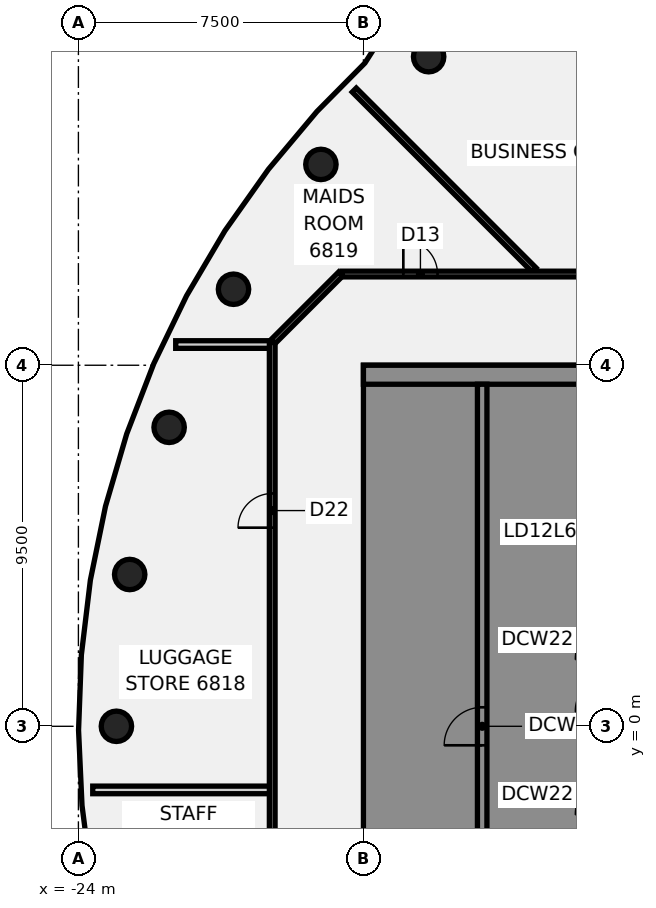
"""IFC4 building model, lengths in metres.
Left out: names, types, materials, properties, quantities, classifications, styles, units other than length and angle.
Written with IfcOpenShell. Run it as: python <this file> out.ifc"""

import sys

from ifc_helpers import new_model, si_unit, direction, frame, frame_2d, origin, origin_2d, place, context, subcontext, project, spatial, polyline, rectangle, circle, outline, extrude, element, fill, save


model = new_model("IFC4")
c1 = context("Model", 3, precision=1e-05, world=origin(), true_north=direction((0.0, 1.0)))
c2 = subcontext(c1, "Body", "Model", "MODEL_VIEW")
j1 = project(units=[si_unit("LENGTHUNIT", "METRE"), si_unit("PLANEANGLEUNIT", "RADIAN")], contexts=[c1])
p1 = place(None, origin())
s1 = spatial("IfcSite", under=j1, at=p1, CompositionType="ELEMENT")
p2 = place(p1, origin())
s2 = spatial("IfcBuilding", under=s1, at=p2, CompositionType="ELEMENT")
p3 = place(p2, frame((0.0, 0.0, 267.6)))
s3 = spatial("IfcBuildingStorey", under=s2, at=p3, CompositionType="ELEMENT", Elevation=267.6)
for number, where, z_axis, x_axis in (
    (1, (-14.784, 17.619, -0.14), (0.0, 0.0, 1.0), (1.0, 0.0, 0.0)),
    (2, (-17.619, 14.784, -0.14), (0.0, 0.0, 1.0), (1.0, 0.0, 0.0)),
    (3, (-19.919, 11.5, -0.14), (0.0, 0.0, 1.0), (1.0, 0.0, 0.0)),
    (4, (-21.613, 7.866, -0.14), (0.0, 0.0, 1.0), (1.0, 0.0, 0.0)),
    (5, (-22.651, 3.994, -0.14), (0.0, 0.0, 1.0), (1.0, 0.0, 0.0)),
    (6, (-23.0, 0.0, -0.14), (0.0, 0.0, 1.0), (1.0, 0.0, 0.0)),
):
    element("IfcColumn", number, at=place(p3, frame(where, z_axis=z_axis, x_axis=x_axis)), inside=s3, PredefinedType="COLUMN", context=c2, shape_type="SweptSolid", body=[
        extrude(circle(Radius=0.4, at=origin_2d()), origin(), (0.0, 0.0, 1.0), 3.6),
    ])
p4 = place(p3, frame((-16.741, 16.741, 0.0), z_axis=(0.0, 0.0, 1.0), x_axis=(0.707106781187, -0.707106781187, 0.0)))
e7 = element("IfcWall", 7, at=p4, inside=s3, PredefinedType="PARTITIONING", context=c2, shape_type="SweptSolid", body=[
    extrude(rectangle(XDim=6.691, YDim=0.15, at=frame_2d((3.346, 0.0))), origin(), (0.0, 0.0, 1.0), 2.864),
])
p5 = place(p3, frame((-15.587, 20.942, 0.0), z_axis=(0.0, 0.0, 1.0), x_axis=(0.904653653251, -0.426147589058, 0.0)))
e8 = element("IfcWall", 8, at=p5, inside=s3, PredefinedType="PARTITIONING", context=c2, shape_type="SweptSolid", body=[
    extrude(rectangle(XDim=20.927, YDim=0.15, at=frame_2d((10.463, 0.0))), origin(), (0.0, 0.0, 1.0), 2.864),
])
p6 = place(p5, frame((13.599, 0.0, 0.0)))
e9 = element("IfcOpeningElement", 9, at=p6, cuts=e8, PredefinedType="OPENING", context=c2, shape_type="SweptSolid", body=[
    extrude(rectangle(XDim=1.8, YDim=2.1, at=frame_2d((0.9, 1.05))), frame((0.0, 0.085, 0.0), z_axis=(0.0, -1.0, 0.0), x_axis=(1.0, 0.0, 0.0)), (0.0, 0.0, 1.0), 0.17),
])
p7 = place(p3, frame((-23.623, -1.674, 0.0), z_axis=(0.0, 0.0, 1.0), x_axis=(1.0, 0.0, 0.0)))
e10 = element("IfcWall", 10, at=p7, inside=s3, PredefinedType="PARTITIONING", context=c2, shape_type="SweptSolid", body=[
    extrude(rectangle(XDim=4.668, YDim=0.2, at=frame_2d((2.334, 0.0))), origin(), (0.0, 0.0, 1.0), 2.864),
])
p8 = place(p3, frame((-21.44, 10.045, 0.0), z_axis=(0.0, 0.0, 1.0), x_axis=(1.0, 0.0, 0.0)))
e11 = element("IfcWall", 11, at=p8, inside=s3, PredefinedType="PARTITIONING", context=c2, shape_type="SweptSolid", body=[
    extrude(rectangle(XDim=2.485, YDim=0.2, at=frame_2d((1.242, 0.0))), origin(), (0.0, 0.0, 1.0), 2.864),
])
p9 = place(p3, frame((-17.065, 11.9, 0.0), z_axis=(0.0, 0.0, 1.0), x_axis=(1.0, 0.0, 0.0)))
e12 = element("IfcWall", 12, at=p9, inside=s3, PredefinedType="PARTITIONING", context=c2, shape_type="SweptSolid", body=[
    extrude(rectangle(XDim=34.165, YDim=0.15, at=frame_2d((17.083, 0.0))), origin(), (0.0, 0.0, 1.0), 2.864),
])
p10 = place(p9, frame((23.372, 0.0, 0.0)))
e13 = element("IfcOpeningElement", 13, at=p10, cuts=e12, PredefinedType="OPENING", context=c2, shape_type="SweptSolid", body=[
    extrude(rectangle(XDim=1.8, YDim=2.1, at=frame_2d((0.9, 1.05))), frame((0.0, 0.085, 0.0), z_axis=(0.0, -1.0, 0.0), x_axis=(1.0, 0.0, 0.0)), (0.0, 0.0, 1.0), 0.17),
])
p11 = place(p9, frame((1.615, 0.0, 0.0)))
e14 = element("IfcOpeningElement", 14, at=p11, cuts=e12, PredefinedType="OPENING", context=c2, shape_type="SweptSolid", body=[
    extrude(rectangle(XDim=0.9, YDim=2.1, at=frame_2d((0.45, 1.05))), frame((0.0, 0.085, 0.0), z_axis=(0.0, -1.0, 0.0), x_axis=(1.0, 0.0, 0.0)), (0.0, 0.0, 1.0), 0.17),
])
p12 = place(p9, frame((31.665, 0.0, 0.0)))
e15 = element("IfcOpeningElement", 15, at=p12, cuts=e12, PredefinedType="OPENING", context=c2, shape_type="SweptSolid", body=[
    extrude(rectangle(XDim=0.9, YDim=2.1, at=frame_2d((0.45, 1.05))), frame((0.0, 0.085, 0.0), z_axis=(0.0, -1.0, 0.0), x_axis=(1.0, 0.0, 0.0)), (0.0, 0.0, 1.0), 0.17),
])
p13 = place(p9, frame((12.065, 0.0, 0.0)))
e16 = element("IfcOpeningElement", 16, at=p13, cuts=e12, PredefinedType="OPENING", context=c2, shape_type="SweptSolid", body=[
    extrude(rectangle(XDim=1.8, YDim=2.1, at=frame_2d((0.9, 1.05))), frame((0.0, 0.085, 0.0), z_axis=(0.0, -1.0, 0.0), x_axis=(1.0, 0.0, 0.0)), (0.0, 0.0, 1.0), 0.17),
])
p14 = place(p3, frame((-18.886, 10.114, 0.0), z_axis=(0.0, 0.0, 1.0), x_axis=(0.707106781187, 0.707106781187, 0.0)))
e17 = element("IfcWall", 17, at=p14, inside=s3, PredefinedType="PARTITIONING", context=c2, shape_type="SweptSolid", body=[
    extrude(rectangle(XDim=2.526, YDim=0.15, at=frame_2d((1.263, 0.0))), origin(), (0.0, 0.0, 1.0), 2.864),
])
p15 = place(p3, frame((-18.9, -10.1, 0.0), z_axis=(0.0, 0.0, 1.0), x_axis=(0.0, 1.0, 0.0)))
e18 = element("IfcWall", 18, at=p15, inside=s3, PredefinedType="PARTITIONING", context=c2, shape_type="SweptSolid", body=[
    extrude(rectangle(XDim=20.2, YDim=0.15, at=frame_2d((10.1, 0.0))), origin(), (0.0, 0.0, 1.0), 2.864),
])
p16 = place(p15, frame((2.7, 0.0, 0.0)))
e19 = element("IfcOpeningElement", 19, at=p16, cuts=e18, PredefinedType="OPENING", context=c2, shape_type="SweptSolid", body=[
    extrude(rectangle(XDim=0.9, YDim=2.1, at=frame_2d((0.45, 1.05))), frame((0.0, 0.085, 0.0), z_axis=(0.0, -1.0, 0.0), x_axis=(1.0, 0.0, 0.0)), (0.0, 0.0, 1.0), 0.17),
])
p17 = place(p15, frame((15.326, 0.0, 0.0)))
e20 = element("IfcOpeningElement", 20, at=p17, cuts=e18, PredefinedType="OPENING", context=c2, shape_type="SweptSolid", body=[
    extrude(rectangle(XDim=0.9, YDim=2.1, at=frame_2d((0.45, 1.05))), frame((0.0, 0.085, 0.0), z_axis=(0.0, -1.0, 0.0), x_axis=(1.0, 0.0, 0.0)), (0.0, 0.0, 1.0), 0.17),
])
p18 = place(p3, origin())
e21 = element("IfcWall", 21, at=p18, inside=s3, PredefinedType="SHEAR", context=c2, shape_type="SweptSolid", body=[
    extrude(outline(polyline([(-13.5, -8.125), (-16.0, -8.125), (-16.0, -5.625), (-13.5, -5.625), (-13.5, -5.375), (-16.0, -5.375), (-16.0, 5.375), (-13.5, 5.375), (-13.5, 5.625), (-16.0, 5.625), (-16.0, 8.125), (-13.5, 8.125), (-13.5, 9.0), (-16.0, 9.0), (-16.5, 9.0), (-16.5, -9.0), (-16.0, -9.0), (-13.5, -9.0), (-13.5, -8.125)])), origin(), (0.0, 0.0, 1.0), 3.46),
])
p19 = place(p3, frame((-16.5, 9.25, 0.0), z_axis=(0.0, 0.0, 1.0), x_axis=(1.0, 0.0, 0.0)))
e22 = element("IfcWall", 22, at=p19, inside=s3, PredefinedType="SHEAR", context=c2, shape_type="SweptSolid", body=[
    extrude(rectangle(XDim=13.0, YDim=0.5, at=frame_2d((6.5, 0.0))), origin(), (0.0, 0.0, 1.0), 3.46),
])
p20 = place(p3, frame((-13.375, -9.0, 0.0), z_axis=(0.0, 0.0, 1.0), x_axis=(0.0, 1.0, 0.0)))
e23 = element("IfcWall", 23, at=p20, inside=s3, PredefinedType="SHEAR", context=c2, shape_type="SweptSolid", body=[
    extrude(rectangle(XDim=18.0, YDim=0.25, at=frame_2d((9.0, 0.0))), origin(), (0.0, 0.0, 1.0), 3.46),
])
p21 = place(p20, frame((1.425, 0.0, 0.0)))
e24 = element("IfcOpeningElement", 24, at=p21, cuts=e23, PredefinedType="OPENING", context=c2, shape_type="SweptSolid", body=[
    extrude(rectangle(XDim=1.4, YDim=2.1, at=frame_2d((0.7, 1.05))), frame((0.0, 0.135, 0.0), z_axis=(0.0, -1.0, 0.0), x_axis=(1.0, 0.0, 0.0)), (0.0, 0.0, 1.0), 0.27),
])
p22 = place(p20, frame((8.5, 0.0, 0.0)))
e25 = element("IfcOpeningElement", 25, at=p22, cuts=e23, PredefinedType="OPENING", context=c2, shape_type="SweptSolid", body=[
    extrude(rectangle(XDim=1.0, YDim=2.1, at=frame_2d((0.5, 1.05))), frame((0.0, 0.135, 0.0), z_axis=(0.0, -1.0, 0.0), x_axis=(1.0, 0.0, 0.0)), (0.0, 0.0, 1.0), 0.27),
])
p23 = place(p11, origin())
e26 = element("IfcDoor", 26, at=p23, inside=s3, OperationType="SINGLE_SWING_RIGHT", PredefinedType="DOOR", context=c2, shape_type="SweptSolid", body=[
    extrude(rectangle(XDim=0.9, YDim=2.1, at=frame_2d((0.45, 1.05))), frame((0.0, 0.025, 0.0), z_axis=(0.0, -1.0, 0.0), x_axis=(1.0, 0.0, 0.0)), (0.0, 0.0, 1.0), 0.05),
])
fill(e14, e26)
p24 = place(p17, origin())
e27 = element("IfcDoor", 27, at=p24, inside=s3, OperationType="SINGLE_SWING_LEFT", PredefinedType="DOOR", context=c2, shape_type="SweptSolid", body=[
    extrude(rectangle(XDim=0.9, YDim=2.1, at=frame_2d((0.45, 1.05))), frame((0.0, 0.025, 0.0), z_axis=(0.0, -1.0, 0.0), x_axis=(1.0, 0.0, 0.0)), (0.0, 0.0, 1.0), 0.05),
])
fill(e20, e27)
p25 = place(p22, origin())
e28 = element("IfcDoor", 28, at=p25, inside=s3, OperationType="SINGLE_SWING_LEFT", PredefinedType="DOOR", context=c2, shape_type="SweptSolid", body=[
    extrude(rectangle(XDim=1.0, YDim=2.1, at=frame_2d((0.5, 1.05))), frame((0.0, 0.025, 0.0), z_axis=(0.0, -1.0, 0.0), x_axis=(1.0, 0.0, 0.0)), (0.0, 0.0, 1.0), 0.05),
])
fill(e25, e28)
save(model, sys.argv[1])
